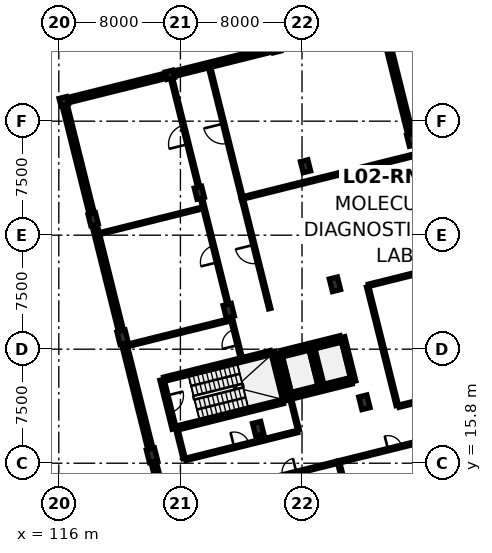
"""IFC4 building model, lengths in metres.
Left out: names, types, materials, properties, quantities, classifications, styles, units other than length and angle.
Written with IfcOpenShell. Run it as: python <this file> out.ifc"""

import sys

from ifc_helpers import new_model, si_unit, direction, frame, frame_2d, origin, origin_2d, place, context, subcontext, project, spatial, rectangle, extrude, element, fill, save


model = new_model("IFC4")
c1 = context("Model", 3, precision=1e-05, world=origin(), true_north=direction((0.0, 1.0)))
c2 = subcontext(c1, "Body", "Model", "MODEL_VIEW")
j1 = project(units=[si_unit("LENGTHUNIT", "METRE"), si_unit("PLANEANGLEUNIT", "RADIAN")], contexts=[c1])
p1 = place(None, origin())
s1 = spatial("IfcSite", under=j1, at=p1, CompositionType="ELEMENT")
p2 = place(p1, origin())
s2 = spatial("IfcBuilding", under=s1, at=p2, CompositionType="ELEMENT")
p3 = place(p2, frame((0.0, 0.0, 9.5)))
s3 = spatial("IfcBuildingStorey", under=s2, at=p3, CompositionType="ELEMENT", Elevation=9.5)
for number, where, z_axis, x_axis in (
    (1, (122.129, 16.325, 0.0), (0.0, 0.0, 1.0), (0.97, 0.242, 0.0)),
    (2, (120.194, 24.087, 0.0), (0.0, 0.0, 1.0), (0.97, 0.242, 0.0)),
):
    element("IfcColumn", number, at=place(p3, frame(where, z_axis=z_axis, x_axis=x_axis)), inside=s3, PredefinedType="COLUMN", context=c2, shape_type="SweptSolid", body=[
        extrude(rectangle(XDim=0.55, YDim=0.85, at=origin_2d()), origin(), (0.0, 0.0, 1.0), 3.7),
    ])
p4 = place(p3, frame((118.259, 31.849, 0.0), z_axis=(0.0, 0.0, 1.0), x_axis=(0.970295726276, 0.2419218956, 0.0)))
e3 = element("IfcColumn", 3, at=p4, inside=s3, PredefinedType="COLUMN", context=c2, shape_type="SweptSolid", body=[
    extrude(rectangle(XDim=0.5, YDim=0.75, at=origin_2d()), origin(), (0.0, 0.0, 1.0), 3.7),
])
p5 = place(p3, frame((116.323, 39.612, 0.0), z_axis=(0.0, 0.0, 1.0), x_axis=(0.970295726276, 0.2419218956, 0.0)))
e4 = element("IfcColumn", 4, at=p5, inside=s3, PredefinedType="COLUMN", context=c2, shape_type="SweptSolid", body=[
    extrude(rectangle(XDim=0.5, YDim=0.5, at=origin_2d()), origin(), (0.0, 0.0, 1.0), 5.226),
])
for number, where, z_axis, x_axis in (
    (5, (129.115, 18.067, 0.0), (0.0, 0.0, 1.0), (0.97, 0.242, 0.0)),
    (6, (127.18, 25.829, 0.0), (0.0, 0.0, 1.0), (0.97, 0.242, 0.0)),
):
    element("IfcColumn", number, at=place(p3, frame(where, z_axis=z_axis, x_axis=x_axis)), inside=s3, PredefinedType="COLUMN", context=c2, shape_type="SweptSolid", body=[
        extrude(rectangle(XDim=0.55, YDim=0.85, at=origin_2d()), origin(), (0.0, 0.0, 1.0), 3.7),
    ])
p6 = place(p3, frame((125.245, 33.591, 0.0), z_axis=(0.0, 0.0, 1.0), x_axis=(0.970295726276, 0.2419218956, 0.0)))
e7 = element("IfcColumn", 7, at=p6, inside=s3, PredefinedType="COLUMN", context=c2, shape_type="SweptSolid", body=[
    extrude(rectangle(XDim=0.5, YDim=0.75, at=origin_2d()), origin(), (0.0, 0.0, 1.0), 3.7),
])
p7 = place(p3, frame((123.309, 41.354, 0.0), z_axis=(0.0, 0.0, 1.0), x_axis=(0.970295726276, 0.2419218956, 0.0)))
e8 = element("IfcColumn", 8, at=p7, inside=s3, PredefinedType="COLUMN", context=c2, shape_type="SweptSolid", body=[
    extrude(rectangle(XDim=0.5, YDim=0.5, at=origin_2d()), origin(), (0.0, 0.0, 1.0), 5.226),
])
for number, where, z_axis, x_axis in (
    (9, (136.102, 19.808, 0.0), (0.0, 0.0, 1.0), (0.97, 0.242, 0.0)),
    (10, (134.166, 27.571, 0.0), (0.0, 0.0, 1.0), (0.97, 0.242, 0.0)),
):
    element("IfcColumn", number, at=place(p3, frame(where, z_axis=z_axis, x_axis=x_axis)), inside=s3, PredefinedType="COLUMN", context=c2, shape_type="SweptSolid", body=[
        extrude(rectangle(XDim=0.55, YDim=0.85, at=origin_2d()), origin(), (0.0, 0.0, 1.0), 3.7),
    ])
p8 = place(p3, frame((132.231, 35.333, 0.0), z_axis=(0.0, 0.0, 1.0), x_axis=(0.970295726276, 0.2419218956, 0.0)))
e11 = element("IfcColumn", 11, at=p8, inside=s3, PredefinedType="COLUMN", context=c2, shape_type="SweptSolid", body=[
    extrude(rectangle(XDim=0.5, YDim=0.75, at=origin_2d()), origin(), (0.0, 0.0, 1.0), 3.7),
])
p9 = place(p3, frame((130.295, 43.095, 0.0), z_axis=(0.0, 0.0, 1.0), x_axis=(0.970295726276, 0.2419218956, 0.0)))
e12 = element("IfcColumn", 12, at=p9, inside=s3, PredefinedType="COLUMN", context=c2, shape_type="SweptSolid", body=[
    extrude(rectangle(XDim=0.5, YDim=0.5, at=origin_2d()), origin(), (0.0, 0.0, 1.0), 5.226),
])
p10 = place(p3, frame((139.217, 37.075, 0.0), z_axis=(0.0, 0.0, 1.0), x_axis=(0.970295726276, 0.2419218956, 0.0)))
e13 = element("IfcColumn", 13, at=p10, inside=s3, PredefinedType="COLUMN", context=c2, shape_type="SweptSolid", body=[
    extrude(rectangle(XDim=0.5, YDim=0.75, at=origin_2d()), origin(), (0.0, 0.0, 1.0), 3.7),
])
p11 = place(p3, frame((123.962, 8.975, 0.0), z_axis=(0.0, 0.0, 1.0), x_axis=(-0.241924964772, 0.97029496104, 0.0)))
e14 = element("IfcWall", 14, at=p11, inside=s3, PredefinedType="SOLIDWALL", context=c2, shape_type="SweptSolid", body=[
    extrude(rectangle(XDim=7.15, YDim=0.35, at=frame_2d((3.575, 0.0))), origin(), (0.0, 0.0, 1.0), 2.985),
])
p12 = place(p3, frame((122.026, 16.737, 0.0), z_axis=(0.0, 0.0, 1.0), x_axis=(-0.241916949628, 0.970296959432, 0.0)))
e15 = element("IfcWall", 15, at=p12, inside=s3, PredefinedType="SOLIDWALL", context=c2, shape_type="SweptSolid", body=[
    extrude(rectangle(XDim=7.15, YDim=0.35, at=frame_2d((3.575, 0.0))), origin(), (0.0, 0.0, 1.0), 2.985),
])
p13 = place(p3, frame((120.091, 24.5, 0.0), z_axis=(0.0, 0.0, 1.0), x_axis=(-0.241937193493, 0.970291911955, 0.0)))
e16 = element("IfcWall", 16, at=p13, inside=s3, PredefinedType="SOLIDWALL", context=c2, shape_type="SweptSolid", body=[
    extrude(rectangle(XDim=7.2, YDim=0.35, at=frame_2d((3.6, 0.0))), origin(), (0.0, 0.0, 1.0), 2.985),
])
p14 = place(p3, frame((118.168, 32.213, 0.0), z_axis=(0.0, 0.0, 1.0), x_axis=(-0.241928011715, 0.970294201337, 0.0)))
e17 = element("IfcWall", 17, at=p14, inside=s3, PredefinedType="SOLIDWALL", context=c2, shape_type="SweptSolid", body=[
    extrude(rectangle(XDim=7.375, YDim=0.35, at=frame_2d((3.688, 0.0))), origin(), (0.0, 0.0, 1.0), 3.035),
])
for number, where, z_axis, x_axis in (
    (18, (116.566, 39.672, 0.0), (0.0, 0.0, 1.0), (0.97, 0.242, 0.0)),
    (19, (123.552, 41.414, 0.0), (0.0, 0.0, 1.0), (0.97, 0.242, 0.0)),
):
    element("IfcWall", number, at=place(p3, frame(where, z_axis=z_axis, x_axis=x_axis)), inside=s3, PredefinedType="SOLIDWALL", context=c2, shape_type="SweptSolid", body=[
        extrude(rectangle(XDim=6.7, YDim=0.35, at=frame_2d((3.35, 0.0))), origin(), (0.0, 0.0, 1.0), 3.67),
    ])
p15 = place(p3, frame((137.342, 44.595, 0.0), z_axis=(0.0, 0.0, 1.0), x_axis=(0.241920240952, -0.970296138825, 0.0)))
e20 = element("IfcWall", 20, at=p15, inside=s3, PredefinedType="SOLIDWALL", context=c2, shape_type="SweptSolid", body=[
    extrude(rectangle(XDim=7.375, YDim=0.35, at=frame_2d((3.688, 0.0))), origin(), (0.0, 0.0, 1.0), 3.035),
])
p16 = place(p3, frame((123.731, 18.105, 0.0), z_axis=(0.0, 0.0, 1.0), x_axis=(0.970297238923, 0.241915828623, 0.0)))
e21 = element("IfcWall", 21, at=p16, inside=s3, PredefinedType="SHEAR", context=c2, shape_type="SweptSolid", body=[
    extrude(rectangle(XDim=7.23, YDim=0.28, at=frame_2d((3.615, 0.0))), origin(), (0.0, 0.0, 1.0), 3.7),
])
p17 = place(p3, frame((130.887, 19.889, 0.0), z_axis=(0.0, 0.0, 1.0), x_axis=(-0.241947258837, 0.970289402158, 0.0)))
e22 = element("IfcWall", 22, at=p17, inside=s3, PredefinedType="SHEAR", context=c2, shape_type="SweptSolid", body=[
    extrude(rectangle(XDim=3.32, YDim=0.28, at=frame_2d((1.66, 0.0))), origin(), (0.0, 0.0, 1.0), 3.7),
])
p18 = place(p3, frame((129.943, 23.076, 0.0), z_axis=(0.0, 0.0, 1.0), x_axis=(-0.970289312034, -0.241947620266, 0.0)))
e23 = element("IfcWall", 23, at=p18, inside=s3, PredefinedType="SHEAR", context=c2, shape_type="SweptSolid", body=[
    extrude(rectangle(XDim=7.23, YDim=0.28, at=frame_2d((3.615, 0.0))), origin(), (0.0, 0.0, 1.0), 3.7),
])
p19 = place(p3, frame((122.787, 21.292, 0.0), z_axis=(0.0, 0.0, 1.0), x_axis=(0.241860763027, -0.970310966293, 0.0)))
e24 = element("IfcWall", 24, at=p19, inside=s3, PredefinedType="SHEAR", context=c2, shape_type="SweptSolid", body=[
    extrude(rectangle(XDim=3.32, YDim=0.28, at=frame_2d((1.66, 0.0))), origin(), (0.0, 0.0, 1.0), 3.7),
])
p20 = place(p19, frame((1.085, 0.0, 0.0)))
e25 = element("IfcOpeningElement", 25, at=p20, cuts=e24, PredefinedType="OPENING", context=c2, shape_type="SweptSolid", body=[
    extrude(rectangle(XDim=1.15, YDim=2.15, at=frame_2d((0.575, 1.075))), frame((0.0, 0.152, 0.0), z_axis=(0.0, -1.0, 0.0), x_axis=(1.0, 0.0, 0.0)), (0.0, 0.0, 1.0), 0.304),
])
p21 = place(p3, frame((131.363, 20.176, 0.0), z_axis=(0.0, 0.0, 1.0), x_axis=(0.970284587517, 0.241966566341, 0.0)))
e26 = element("IfcWall", 26, at=p21, inside=s3, PredefinedType="SHEAR", context=c2, shape_type="SweptSolid", body=[
    extrude(rectangle(XDim=1.817, YDim=0.28, at=frame_2d((0.909, 0.0))), origin(), (0.0, 0.0, 1.0), 3.7),
])
p22 = place(p3, frame((133.267, 20.651, 0.0), z_axis=(0.0, 0.0, 1.0), x_axis=(-0.241921647353, 0.970295788171, 0.0)))
e27 = element("IfcWall", 27, at=p22, inside=s3, PredefinedType="SHEAR", context=c2, shape_type="SweptSolid", body=[
    extrude(rectangle(XDim=2.994, YDim=0.28, at=frame_2d((1.497, 0.0))), origin(), (0.0, 0.0, 1.0), 3.7),
])
p23 = place(p3, frame((132.402, 23.521, 0.0), z_axis=(0.0, 0.0, 1.0), x_axis=(-0.970284587517, -0.241966566341, 0.0)))
e28 = element("IfcWall", 28, at=p23, inside=s3, PredefinedType="SHEAR", context=c2, shape_type="SweptSolid", body=[
    extrude(rectangle(XDim=1.817, YDim=0.28, at=frame_2d((0.909, 0.0))), origin(), (0.0, 0.0, 1.0), 3.7),
])
p24 = place(p23, frame((0.259, 0.0, 0.0)))
e29 = element("IfcOpeningElement", 29, at=p24, cuts=e28, PredefinedType="OPENING", context=c2, shape_type="SweptSolid", body=[
    extrude(rectangle(XDim=1.3, YDim=2.2, at=frame_2d((0.65, 1.1))), frame((0.0, 0.152, 0.0), z_axis=(0.0, -1.0, 0.0), x_axis=(1.0, 0.0, 0.0)), (0.0, 0.0, 1.0), 0.304),
])
p25 = place(p3, frame((130.498, 23.046, 0.0), z_axis=(0.0, 0.0, 1.0), x_axis=(0.241921647353, -0.970295788171, 0.0)))
e30 = element("IfcWall", 30, at=p25, inside=s3, PredefinedType="SHEAR", context=c2, shape_type="SweptSolid", body=[
    extrude(rectangle(XDim=2.994, YDim=0.28, at=frame_2d((1.497, 0.0))), origin(), (0.0, 0.0, 1.0), 3.7),
])
p26 = place(p3, frame((133.408, 20.686, 0.0), z_axis=(0.0, 0.0, 1.0), x_axis=(0.970285190026, 0.241964150272, 0.0)))
e31 = element("IfcWall", 31, at=p26, inside=s3, PredefinedType="SHEAR", context=c2, shape_type="SweptSolid", body=[
    extrude(rectangle(XDim=1.91, YDim=0.28, at=frame_2d((0.955, 0.0))), origin(), (0.0, 0.0, 1.0), 3.7),
])
p27 = place(p3, frame((135.402, 21.183, 0.0), z_axis=(0.0, 0.0, 1.0), x_axis=(-0.241921647353, 0.970295788171, 0.0)))
e32 = element("IfcWall", 32, at=p27, inside=s3, PredefinedType="SHEAR", context=c2, shape_type="SweptSolid", body=[
    extrude(rectangle(XDim=2.994, YDim=0.28, at=frame_2d((1.497, 0.0))), origin(), (0.0, 0.0, 1.0), 3.7),
])
p28 = place(p3, frame((134.537, 24.053, 0.0), z_axis=(0.0, 0.0, 1.0), x_axis=(-0.970285190026, -0.241964150272, 0.0)))
e33 = element("IfcWall", 33, at=p28, inside=s3, PredefinedType="SHEAR", context=c2, shape_type="SweptSolid", body=[
    extrude(rectangle(XDim=1.91, YDim=0.28, at=frame_2d((0.955, 0.0))), origin(), (0.0, 0.0, 1.0), 3.7),
])
p29 = place(p28, frame((0.305, 0.0, 0.0)))
e34 = element("IfcOpeningElement", 34, at=p29, cuts=e33, PredefinedType="OPENING", context=c2, shape_type="SweptSolid", body=[
    extrude(rectangle(XDim=1.3, YDim=2.2, at=frame_2d((0.65, 1.1))), frame((0.0, 0.152, 0.0), z_axis=(0.0, -1.0, 0.0), x_axis=(1.0, 0.0, 0.0)), (0.0, 0.0, 1.0), 0.304),
])
p30 = place(p3, frame((124.346, 16.053, 0.0), z_axis=(0.0, 0.0, 1.0), x_axis=(0.970295772287, 0.241921711059, 0.0)))
e35 = element("IfcWall", 35, at=p30, inside=s3, PredefinedType="PARTITIONING", context=c2, shape_type="SweptSolid", body=[
    extrude(rectangle(XDim=7.58, YDim=0.16, at=frame_2d((3.79, 0.0))), origin(), (0.0, 0.0, 1.0), 2.885),
])
p31 = place(p30, frame((3.29, 0.0, 0.0)))
e36 = element("IfcOpeningElement", 36, at=p31, cuts=e35, PredefinedType="OPENING", context=c2, shape_type="SweptSolid", body=[
    extrude(rectangle(XDim=1.0, YDim=2.15, at=frame_2d((0.5, 1.075))), frame((0.0, 0.092, 0.0), z_axis=(0.0, -1.0, 0.0), x_axis=(1.0, 0.0, 0.0)), (0.0, 0.0, 1.0), 0.184),
])
p32 = place(p3, frame((128.0, 22.748, 0.0), z_axis=(0.0, 0.0, 1.0), x_axis=(-0.241929995817, 0.970293706629, 0.0)))
e37 = element("IfcWall", 37, at=p32, inside=s3, PredefinedType="PARTITIONING", context=c2, shape_type="SweptSolid", body=[
    extrude(rectangle(XDim=2.751, YDim=0.15, at=frame_2d((1.375, 0.0))), origin(), (0.0, 0.0, 1.0), 3.7),
])
p33 = place(p32, frame((0.851, 0.0, 0.0)))
e38 = element("IfcOpeningElement", 38, at=p33, cuts=e37, PredefinedType="OPENING", context=c2, shape_type="SweptSolid", body=[
    extrude(rectangle(XDim=1.05, YDim=2.15, at=frame_2d((0.525, 1.075))), frame((0.0, 0.087, 0.0), z_axis=(0.0, -1.0, 0.0), x_axis=(1.0, 0.0, 0.0)), (0.0, 0.0, 1.0), 0.174),
])
p34 = place(p3, frame((128.023, 14.29, 0.0), z_axis=(0.0, 0.0, 1.0), x_axis=(0.970297244456, 0.24191580643, 0.0)))
e39 = element("IfcWall", 39, at=p34, inside=s3, PredefinedType="PARTITIONING", context=c2, shape_type="SweptSolid", body=[
    extrude(rectangle(XDim=6.488, YDim=0.16, at=frame_2d((3.244, 0.0))), origin(), (0.0, 0.0, 1.0), 2.885),
])
p35 = place(p34, frame((2.769, 0.0, 0.0)))
e40 = element("IfcOpeningElement", 40, at=p35, cuts=e39, PredefinedType="OPENING", context=c2, shape_type="SweptSolid", body=[
    extrude(rectangle(XDim=0.95, YDim=2.15, at=frame_2d((0.475, 1.075))), frame((0.0, 0.092, 0.0), z_axis=(0.0, -1.0, 0.0), x_axis=(1.0, 0.0, 0.0)), (0.0, 0.0, 1.0), 0.184),
])
p36 = place(p3, frame((134.33, 15.863, 0.0), z_axis=(0.0, 0.0, 1.0), x_axis=(0.970299035042, 0.241908624476, 0.0)))
e41 = element("IfcWall", 41, at=p36, inside=s3, PredefinedType="PARTITIONING", context=c2, shape_type="SweptSolid", body=[
    extrude(rectangle(XDim=7.788, YDim=0.16, at=frame_2d((3.894, 0.0))), origin(), (0.0, 0.0, 1.0), 2.885),
])
p37 = place(p36, frame((3.434, 0.0, 0.0)))
e42 = element("IfcOpeningElement", 42, at=p37, cuts=e41, PredefinedType="OPENING", context=c2, shape_type="SweptSolid", body=[
    extrude(rectangle(XDim=0.92, YDim=2.1, at=frame_2d((0.46, 1.05))), frame((0.0, 0.092, 0.0), z_axis=(0.0, -1.0, 0.0), x_axis=(1.0, 0.0, 0.0)), (0.0, 0.0, 1.0), 0.184),
])
p38 = place(p3, frame((138.367, 19.549, 0.0), z_axis=(0.0, 0.0, 1.0), x_axis=(0.970292133333, 0.241936305651, 0.0)))
e43 = element("IfcWall", 43, at=p38, inside=s3, PredefinedType="PARTITIONING", context=c2, shape_type="SweptSolid", body=[
    extrude(rectangle(XDim=12.078, YDim=0.15, at=frame_2d((6.039, 0.0))), origin(), (0.0, 0.0, 1.0), 2.885),
])
p39 = place(p38, frame((5.829, 0.0, 0.0)))
e44 = element("IfcOpeningElement", 44, at=p39, cuts=e43, PredefinedType="OPENING", context=c2, shape_type="SweptSolid", body=[
    extrude(rectangle(XDim=1.08, YDim=2.18, at=frame_2d((0.54, 1.09))), frame((0.0, 0.087, 0.0), z_axis=(0.0, -1.0, 0.0), x_axis=(1.0, 0.0, 0.0)), (0.0, 0.0, 1.0), 0.174),
])
p40 = place(p3, frame((127.215, 25.894, 0.0), z_axis=(0.0, 0.0, 1.0), x_axis=(-0.241942741181, 0.970290528651, 0.0)))
e45 = element("IfcWall", 45, at=p40, inside=s3, PredefinedType="PARTITIONING", context=c2, shape_type="SweptSolid", body=[
    extrude(rectangle(XDim=7.558, YDim=0.15, at=frame_2d((3.779, 0.0))), origin(), (0.0, 0.0, 1.0), 2.885),
])
p41 = place(p40, frame((3.219, 0.0, 0.0)))
e46 = element("IfcOpeningElement", 46, at=p41, cuts=e45, PredefinedType="OPENING", context=c2, shape_type="SweptSolid", body=[
    extrude(rectangle(XDim=1.12, YDim=2.2, at=frame_2d((0.56, 1.1))), frame((0.0, 0.087, 0.0), z_axis=(0.0, -1.0, 0.0), x_axis=(1.0, 0.0, 0.0)), (0.0, 0.0, 1.0), 0.174),
])
p42 = place(p3, frame((129.876, 25.97, 0.0), z_axis=(0.0, 0.0, 1.0), x_axis=(-0.241938716353, 0.970291532236, 0.0)))
e47 = element("IfcWall", 47, at=p42, inside=s3, PredefinedType="PARTITIONING", context=c2, shape_type="SweptSolid", body=[
    extrude(rectangle(XDim=7.411, YDim=0.15, at=frame_2d((3.706, 0.0))), origin(), (0.0, 0.0, 1.0), 2.985),
])
p43 = place(p42, frame((3.085, 0.0, 0.0)))
e48 = element("IfcOpeningElement", 48, at=p43, cuts=e47, PredefinedType="OPENING", context=c2, shape_type="SweptSolid", body=[
    extrude(rectangle(XDim=1.24, YDim=2.2, at=frame_2d((0.62, 1.1))), frame((0.0, 0.087, 0.0), z_axis=(0.0, -1.0, 0.0), x_axis=(1.0, 0.0, 0.0)), (0.0, 0.0, 1.0), 0.174),
])
p44 = place(p3, frame((125.268, 33.705, 0.0), z_axis=(0.0, 0.0, 1.0), x_axis=(-0.241933510305, 0.970292830331, 0.0)))
e49 = element("IfcWall", 49, at=p44, inside=s3, PredefinedType="PARTITIONING", context=c2, shape_type="SweptSolid", body=[
    extrude(rectangle(XDim=7.633, YDim=0.15, at=frame_2d((3.816, 0.0))), origin(), (0.0, 0.0, 1.0), 2.885),
])
p45 = place(p44, frame((3.177, 0.0, 0.0)))
e50 = element("IfcOpeningElement", 50, at=p45, cuts=e49, PredefinedType="OPENING", context=c2, shape_type="SweptSolid", body=[
    extrude(rectangle(XDim=1.28, YDim=2.22, at=frame_2d((0.64, 1.11))), frame((0.0, 0.087, 0.0), z_axis=(0.0, -1.0, 0.0), x_axis=(1.0, 0.0, 0.0)), (0.0, 0.0, 1.0), 0.174),
])
p46 = place(p3, frame((128.08, 33.173, 0.0), z_axis=(0.0, 0.0, 1.0), x_axis=(-0.241916302916, 0.970297120672, 0.0)))
e51 = element("IfcWall", 51, at=p46, inside=s3, PredefinedType="PARTITIONING", context=c2, shape_type="SweptSolid", body=[
    extrude(rectangle(XDim=8.905, YDim=0.15, at=frame_2d((4.453, 0.0))), origin(), (0.0, 0.0, 1.0), 3.035),
])
p47 = place(p46, frame((3.783, 0.0, 0.0)))
e52 = element("IfcOpeningElement", 52, at=p47, cuts=e51, PredefinedType="OPENING", context=c2, shape_type="SweptSolid", body=[
    extrude(rectangle(XDim=1.34, YDim=2.24, at=frame_2d((0.67, 1.12))), frame((0.0, 0.087, 0.0), z_axis=(0.0, -1.0, 0.0), x_axis=(1.0, 0.0, 0.0)), (0.0, 0.0, 1.0), 0.174),
])
p48 = place(p3, frame((124.243, 16.115, 0.0), z_axis=(0.0, 0.0, 1.0), x_axis=(-0.241962034071, 0.970285717749, 0.0)))
e53 = element("IfcWall", 53, at=p48, inside=s3, PredefinedType="PARTITIONING", context=c2, shape_type="SweptSolid", body=[
    extrude(rectangle(XDim=1.903, YDim=0.15, at=frame_2d((0.952, 0.0))), origin(), (0.0, 0.0, 1.0), 2.985),
])
p49 = place(p3, frame((131.763, 17.99, 0.0), z_axis=(0.0, 0.0, 1.0), x_axis=(-0.241962612769, 0.970285573438, 0.0)))
e54 = element("IfcWall", 54, at=p49, inside=s3, PredefinedType="PARTITIONING", context=c2, shape_type="SweptSolid", body=[
    extrude(rectangle(XDim=2.206, YDim=0.125, at=frame_2d((1.103, 0.0))), origin(), (0.0, 0.0, 1.0), 2.985),
])
p50 = place(p3, frame((120.521, 23.55, 0.0), z_axis=(0.0, 0.0, 1.0), x_axis=(0.970292595263, 0.241934453059, 0.0)))
e55 = element("IfcWall", 55, at=p50, inside=s3, PredefinedType="PARTITIONING", context=c2, shape_type="SweptSolid", body=[
    extrude(rectangle(XDim=6.976, YDim=0.16, at=frame_2d((3.488, 0.0))), origin(), (0.0, 0.0, 1.0), 2.985),
])
p51 = place(p3, frame((136.122, 8.979, 0.0), z_axis=(0.0, 0.0, 1.0), x_axis=(-0.241913757308, 0.970297755344, 0.0)))
e56 = element("IfcWall", 56, at=p51, inside=s3, PredefinedType="PARTITIONING", context=c2, shape_type="SweptSolid", body=[
    extrude(rectangle(XDim=7.021, YDim=0.15, at=frame_2d((3.51, 0.0))), origin(), (0.0, 0.0, 1.0), 2.985),
])
p52 = place(p3, frame((136.383, 27.505, 0.0), z_axis=(0.0, 0.0, 1.0), x_axis=(0.970296878284, 0.241917275099, 0.0)))
e57 = element("IfcWall", 57, at=p52, inside=s3, PredefinedType="PARTITIONING", context=c2, shape_type="SweptSolid", body=[
    extrude(rectangle(XDim=12.078, YDim=0.15, at=frame_2d((6.039, 0.0))), origin(), (0.0, 0.0, 1.0), 2.885),
])
p53 = place(p3, frame((138.264, 19.611, 0.0), z_axis=(0.0, 0.0, 1.0), x_axis=(-0.241920353256, 0.970296110824, 0.0)))
e58 = element("IfcWall", 58, at=p53, inside=s3, PredefinedType="PARTITIONING", context=c2, shape_type="SweptSolid", body=[
    extrude(rectangle(XDim=8.03, YDim=0.16, at=frame_2d((4.015, 0.0))), origin(), (0.0, 0.0, 1.0), 2.985),
])
p54 = place(p3, frame((118.687, 30.906, 0.0), z_axis=(0.0, 0.0, 1.0), x_axis=(0.970292595263, 0.241934453059, 0.0)))
e59 = element("IfcWall", 59, at=p54, inside=s3, PredefinedType="PARTITIONING", context=c2, shape_type="SweptSolid", body=[
    extrude(rectangle(XDim=6.976, YDim=0.125, at=frame_2d((3.488, 0.0))), origin(), (0.0, 0.0, 1.0), 2.885),
])
p55 = place(p3, frame((128.147, 33.264, 0.0), z_axis=(0.0, 0.0, 1.0), x_axis=(0.970294124774, 0.241928318783, 0.0)))
e60 = element("IfcWall", 60, at=p55, inside=s3, PredefinedType="PARTITIONING", context=c2, shape_type="SweptSolid", body=[
    extrude(rectangle(XDim=18.541, YDim=0.16, at=frame_2d((9.271, 0.0))), origin(), (0.0, 0.0, 1.0), 2.885),
])
p56 = place(p20, origin())
e61 = element("IfcDoor", 61, at=p56, inside=s3, OperationType="SINGLE_SWING_LEFT", PredefinedType="DOOR", context=c2, shape_type="SweptSolid", body=[
    extrude(rectangle(XDim=1.15, YDim=2.15, at=frame_2d((0.575, 1.075))), frame((0.0, 0.025, 0.0), z_axis=(0.0, -1.0, 0.0), x_axis=(1.0, 0.0, 0.0)), (0.0, 0.0, 1.0), 0.05),
])
fill(e25, e61)
p57 = place(p24, origin())
e62 = element("IfcDoor", 62, at=p57, inside=s3, OperationType="SLIDING_TO_LEFT", PredefinedType="DOOR", context=c2, shape_type="SweptSolid", body=[
    extrude(rectangle(XDim=1.3, YDim=2.2, at=frame_2d((0.65, 1.1))), frame((0.0, 0.025, 0.0), z_axis=(0.0, -1.0, 0.0), x_axis=(1.0, 0.0, 0.0)), (0.0, 0.0, 1.0), 0.05),
])
fill(e29, e62)
p58 = place(p29, origin())
e63 = element("IfcDoor", 63, at=p58, inside=s3, OperationType="SLIDING_TO_RIGHT", PredefinedType="DOOR", context=c2, shape_type="SweptSolid", body=[
    extrude(rectangle(XDim=1.3, YDim=2.2, at=frame_2d((0.65, 1.1))), frame((0.0, 0.025, 0.0), z_axis=(0.0, -1.0, 0.0), x_axis=(1.0, 0.0, 0.0)), (0.0, 0.0, 1.0), 0.05),
])
fill(e34, e63)
p59 = place(p31, origin())
e64 = element("IfcDoor", 64, at=p59, inside=s3, OperationType="SINGLE_SWING_LEFT", PredefinedType="DOOR", context=c2, shape_type="SweptSolid", body=[
    extrude(rectangle(XDim=1.0, YDim=2.15, at=frame_2d((0.5, 1.075))), frame((0.0, 0.025, 0.0), z_axis=(0.0, -1.0, 0.0), x_axis=(1.0, 0.0, 0.0)), (0.0, 0.0, 1.0), 0.05),
])
fill(e36, e64)
p60 = place(p33, origin())
e65 = element("IfcDoor", 65, at=p60, inside=s3, OperationType="SINGLE_SWING_LEFT", PredefinedType="DOOR", context=c2, shape_type="SweptSolid", body=[
    extrude(rectangle(XDim=1.05, YDim=2.15, at=frame_2d((0.525, 1.075))), frame((0.0, 0.025, 0.0), z_axis=(0.0, -1.0, 0.0), x_axis=(1.0, 0.0, 0.0)), (0.0, 0.0, 1.0), 0.05),
])
fill(e38, e65)
p61 = place(p35, origin())
e66 = element("IfcDoor", 66, at=p61, inside=s3, OperationType="SINGLE_SWING_RIGHT", PredefinedType="DOOR", context=c2, shape_type="SweptSolid", body=[
    extrude(rectangle(XDim=0.95, YDim=2.15, at=frame_2d((0.475, 1.075))), frame((0.0, 0.025, 0.0), z_axis=(0.0, -1.0, 0.0), x_axis=(1.0, 0.0, 0.0)), (0.0, 0.0, 1.0), 0.05),
])
fill(e40, e66)
p62 = place(p37, origin())
e67 = element("IfcDoor", 67, at=p62, inside=s3, OperationType="SINGLE_SWING_LEFT", PredefinedType="DOOR", context=c2, shape_type="SweptSolid", body=[
    extrude(rectangle(XDim=0.92, YDim=2.1, at=frame_2d((0.46, 1.05))), frame((0.0, 0.025, 0.0), z_axis=(0.0, -1.0, 0.0), x_axis=(1.0, 0.0, 0.0)), (0.0, 0.0, 1.0), 0.05),
])
fill(e42, e67)
p63 = place(p41, origin())
e68 = element("IfcDoor", 68, at=p63, inside=s3, OperationType="SINGLE_SWING_LEFT", PredefinedType="DOOR", context=c2, shape_type="SweptSolid", body=[
    extrude(rectangle(XDim=1.12, YDim=2.2, at=frame_2d((0.56, 1.1))), frame((0.0, 0.025, 0.0), z_axis=(0.0, -1.0, 0.0), x_axis=(1.0, 0.0, 0.0)), (0.0, 0.0, 1.0), 0.05),
])
fill(e46, e68)
p64 = place(p43, origin())
e69 = element("IfcDoor", 69, at=p64, inside=s3, OperationType="SINGLE_SWING_RIGHT", PredefinedType="DOOR", context=c2, shape_type="SweptSolid", body=[
    extrude(rectangle(XDim=1.24, YDim=2.2, at=frame_2d((0.62, 1.1))), frame((0.0, 0.025, 0.0), z_axis=(0.0, -1.0, 0.0), x_axis=(1.0, 0.0, 0.0)), (0.0, 0.0, 1.0), 0.05),
])
fill(e48, e69)
p65 = place(p45, origin())
e70 = element("IfcDoor", 70, at=p65, inside=s3, OperationType="SINGLE_SWING_LEFT", PredefinedType="DOOR", context=c2, shape_type="SweptSolid", body=[
    extrude(rectangle(XDim=1.28, YDim=2.22, at=frame_2d((0.64, 1.11))), frame((0.0, 0.025, 0.0), z_axis=(0.0, -1.0, 0.0), x_axis=(1.0, 0.0, 0.0)), (0.0, 0.0, 1.0), 0.05),
])
fill(e50, e70)
p66 = place(p47, origin())
e71 = element("IfcDoor", 71, at=p66, inside=s3, OperationType="SINGLE_SWING_RIGHT", PredefinedType="DOOR", context=c2, shape_type="SweptSolid", body=[
    extrude(rectangle(XDim=1.34, YDim=2.24, at=frame_2d((0.67, 1.12))), frame((0.0, 0.025, 0.0), z_axis=(0.0, -1.0, 0.0), x_axis=(1.0, 0.0, 0.0)), (0.0, 0.0, 1.0), 0.05),
])
fill(e52, e71)
save(model, sys.argv[1])
